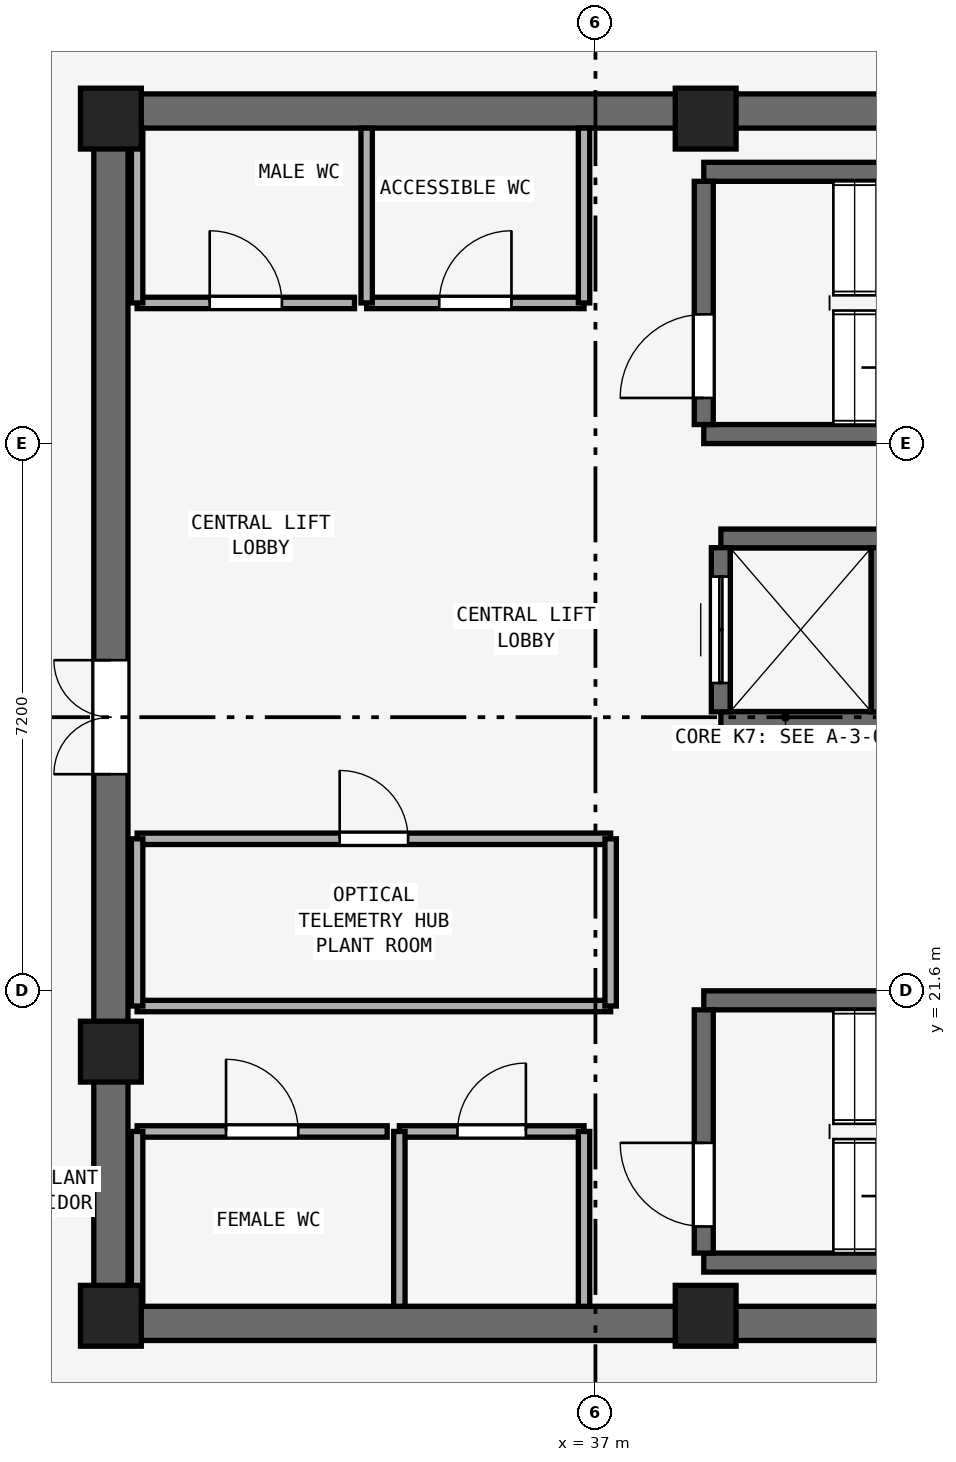
"""IFC4 building model, lengths in metres.
Left out: names, types, materials, properties, quantities, classifications, styles, units other than length and angle.
Written with IfcOpenShell. Run it as: python <this file> out.ifc"""

import sys

from ifc_helpers import new_model, si_unit, direction, frame, frame_2d, origin, origin_2d, place, context, subcontext, project, spatial, rectangle, extrude, element, fill, save


model = new_model("IFC4")
c1 = context("Model", 3, precision=1e-05, world=origin(), true_north=direction((0.0, 1.0)))
c2 = subcontext(c1, "Body", "Model", "MODEL_VIEW")
j1 = project(units=[si_unit("LENGTHUNIT", "METRE"), si_unit("PLANEANGLEUNIT", "RADIAN")], contexts=[c1])
p1 = place(None, origin())
s1 = spatial("IfcSite", under=j1, at=p1, CompositionType="ELEMENT")
p2 = place(p1, origin())
s2 = spatial("IfcBuilding", under=s1, at=p2, CompositionType="ELEMENT")
p3 = place(p2, frame((0.0, 0.0, 321.4)))
s3 = spatial("IfcBuildingStorey", under=s2, at=p3, CompositionType="ELEMENT", Elevation=321.4)
for number, where, z_axis, x_axis in (
    (1, (30.4, 17.225, 0.0), (0.0, 0.0, 1.0), (1.0, 0.0, 0.0)),
    (2, (30.4, 33.175, 0.0), (0.0, 0.0, 1.0), (1.0, 0.0, 0.0)),
):
    element("IfcWall", number, at=place(p3, frame(where, z_axis=z_axis, x_axis=x_axis)), inside=s3, PredefinedType="SHEAR", context=c2, shape_type="SweptSolid", body=[
        extrude(rectangle(XDim=18.2, YDim=0.45, at=frame_2d((9.1, 0.0))), origin(), (0.0, 0.0, 1.0), 3.72),
    ])
p4 = place(p3, frame((30.625, 17.45, 0.0), z_axis=(0.0, 0.0, 1.0), x_axis=(0.0, 1.0, 0.0)))
e3 = element("IfcWall", 3, at=p4, inside=s3, PredefinedType="SHEAR", context=c2, shape_type="SweptSolid", body=[
    extrude(rectangle(XDim=15.5, YDim=0.45, at=frame_2d((7.75, 0.0))), origin(), (0.0, 0.0, 1.0), 3.72),
])
p5 = place(p4, frame((7.0, 0.0, 0.0)))
e4 = element("IfcOpeningElement", 4, at=p5, cuts=e3, PredefinedType="OPENING", context=c2, shape_type="SweptSolid", body=[
    extrude(rectangle(XDim=1.5, YDim=2.15, at=frame_2d((0.75, 1.075))), frame((0.0, 0.235, 0.0), z_axis=(0.0, -1.0, 0.0), x_axis=(1.0, 0.0, 0.0)), (0.0, 0.0, 1.0), 0.47),
])
for number, where, z_axis, x_axis in (
    (5, (30.625, 17.325, 0.0), (0.0, 0.0, 1.0), (1.0, 0.0, 0.0)),
    (6, (38.45, 17.325, 0.0), (0.0, 0.0, 1.0), (1.0, 0.0, 0.0)),
    (7, (38.45, 33.075, 0.0), (0.0, 0.0, 1.0), (1.0, 0.0, 0.0)),
    (8, (30.625, 33.075, 0.0), (0.0, 0.0, 1.0), (1.0, 0.0, 0.0)),
    (9, (30.625, 20.8, 0.0), (0.0, 0.0, 1.0), (1.0, 0.0, 0.0)),
):
    element("IfcColumn", number, at=place(p3, frame(where, z_axis=z_axis, x_axis=x_axis)), inside=s3, PredefinedType="PILASTER", context=c2, shape_type="SweptSolid", body=[
        extrude(rectangle(XDim=0.8, YDim=0.8, at=origin_2d()), origin(), (0.0, 0.0, 1.0), 4.0),
    ])
for number, where, z_axis, x_axis in (
    (10, (38.425, 28.925, 0.0), (0.0, 0.0, 1.0), (1.0, 0.0, 0.0)),
    (11, (38.425, 32.375, 0.0), (0.0, 0.0, 1.0), (1.0, 0.0, 0.0)),
):
    element("IfcWall", number, at=place(p3, frame(where, z_axis=z_axis, x_axis=x_axis)), inside=s3, PredefinedType="SHEAR", context=c2, shape_type="SweptSolid", body=[
        extrude(rectangle(XDim=7.3, YDim=0.25, at=frame_2d((3.65, 0.0))), origin(), (0.0, 0.0, 1.0), 3.72),
    ])
p6 = place(p3, frame((38.425, 29.05, 0.0), z_axis=(0.0, 0.0, 1.0), x_axis=(0.0, 1.0, 0.0)))
e12 = element("IfcWall", 12, at=p6, inside=s3, PredefinedType="SHEAR", context=c2, shape_type="SweptSolid", body=[
    extrude(rectangle(XDim=3.2, YDim=0.25, at=frame_2d((1.6, 0.0))), origin(), (0.0, 0.0, 1.0), 3.72),
])
p7 = place(p6, frame((0.35, 0.0, 0.0)))
e13 = element("IfcOpeningElement", 13, at=p7, cuts=e12, PredefinedType="OPENING", context=c2, shape_type="SweptSolid", body=[
    extrude(rectangle(XDim=1.1, YDim=2.15, at=frame_2d((0.55, 1.075))), frame((0.0, 0.135, 0.0), z_axis=(0.0, -1.0, 0.0), x_axis=(1.0, 0.0, 0.0)), (0.0, 0.0, 1.0), 0.27),
])
for number, where, z_axis, x_axis in (
    (14, (38.425, 18.025, 0.0), (0.0, 0.0, 1.0), (1.0, 0.0, 0.0)),
    (15, (38.425, 21.475, 0.0), (0.0, 0.0, 1.0), (1.0, 0.0, 0.0)),
):
    element("IfcWall", number, at=place(p3, frame(where, z_axis=z_axis, x_axis=x_axis)), inside=s3, PredefinedType="SHEAR", context=c2, shape_type="SweptSolid", body=[
        extrude(rectangle(XDim=7.3, YDim=0.25, at=frame_2d((3.65, 0.0))), origin(), (0.0, 0.0, 1.0), 3.72),
    ])
p8 = place(p3, frame((38.425, 18.15, 0.0), z_axis=(0.0, 0.0, 1.0), x_axis=(0.0, 1.0, 0.0)))
e16 = element("IfcWall", 16, at=p8, inside=s3, PredefinedType="SHEAR", context=c2, shape_type="SweptSolid", body=[
    extrude(rectangle(XDim=3.2, YDim=0.25, at=frame_2d((1.6, 0.0))), origin(), (0.0, 0.0, 1.0), 3.72),
])
p9 = place(p8, frame((0.35, 0.0, 0.0)))
e17 = element("IfcOpeningElement", 17, at=p9, cuts=e16, PredefinedType="OPENING", context=c2, shape_type="SweptSolid", body=[
    extrude(rectangle(XDim=1.1, YDim=2.15, at=frame_2d((0.55, 1.075))), frame((0.0, 0.135, 0.0), z_axis=(0.0, -1.0, 0.0), x_axis=(1.0, 0.0, 0.0)), (0.0, 0.0, 1.0), 0.27),
])
for number, where, z_axis, x_axis in (
    (18, (38.65, 25.15, 0.0), (0.0, 0.0, 1.0), (1.0, 0.0, 0.0)),
    (19, (38.65, 27.55, 0.0), (0.0, 0.0, 1.0), (1.0, 0.0, 0.0)),
):
    element("IfcWall", number, at=place(p3, frame(where, z_axis=z_axis, x_axis=x_axis)), inside=s3, PredefinedType="SHEAR", context=c2, shape_type="SweptSolid", body=[
        extrude(rectangle(XDim=2.1, YDim=0.25, at=frame_2d((1.05, 0.0))), origin(), (0.0, 0.0, 1.0), 3.72),
    ])
p10 = place(p3, frame((38.65, 25.27, 0.0), z_axis=(0.0, 0.0, 1.0), x_axis=(0.0, 1.0, 0.0)))
e20 = element("IfcWall", 20, at=p10, inside=s3, PredefinedType="SHEAR", context=c2, shape_type="SweptSolid", body=[
    extrude(rectangle(XDim=2.16, YDim=0.25, at=frame_2d((1.08, 0.0))), origin(), (0.0, 0.0, 1.0), 3.72),
])
p11 = place(p10, frame((0.38, 0.0, 0.0)))
e21 = element("IfcOpeningElement", 21, at=p11, cuts=e20, PredefinedType="OPENING", context=c2, shape_type="SweptSolid", body=[
    extrude(rectangle(XDim=1.4, YDim=2.2, at=frame_2d((0.7, 1.1))), frame((0.0, 0.135, 0.0), z_axis=(0.0, -1.0, 0.0), x_axis=(1.0, 0.0, 0.0)), (0.0, 0.0, 1.0), 0.27),
])
p12 = place(p3, frame((40.75, 25.27, 0.0), z_axis=(0.0, 0.0, 1.0), x_axis=(0.0, 1.0, 0.0)))
e22 = element("IfcWall", 22, at=p12, inside=s3, PredefinedType="SHEAR", context=c2, shape_type="SweptSolid", body=[
    extrude(rectangle(XDim=2.16, YDim=0.25, at=frame_2d((1.08, 0.0))), origin(), (0.0, 0.0, 1.0), 3.72),
])
p13 = place(p3, frame((30.97, 30.65, 0.0), z_axis=(0.0, 0.0, 1.0), x_axis=(1.0, 0.0, 0.0)))
e23 = element("IfcWall", 23, at=p13, inside=s3, PredefinedType="PARTITIONING", context=c2, shape_type="SweptSolid", body=[
    extrude(rectangle(XDim=2.86, YDim=0.15, at=frame_2d((1.43, 0.0))), origin(), (0.0, 0.0, 1.0), 3.72),
])
p14 = place(p13, frame((0.955, 0.0, 0.0)))
e24 = element("IfcOpeningElement", 24, at=p14, cuts=e23, PredefinedType="OPENING", context=c2, shape_type="SweptSolid", body=[
    extrude(rectangle(XDim=0.95, YDim=2.1, at=frame_2d((0.475, 1.05))), frame((0.0, 0.085, 0.0), z_axis=(0.0, -1.0, 0.0), x_axis=(1.0, 0.0, 0.0)), (0.0, 0.0, 1.0), 0.17),
])
p15 = place(p3, frame((30.97, 30.65, 0.0), z_axis=(0.0, 0.0, 1.0), x_axis=(0.0, 1.0, 0.0)))
e25 = element("IfcWall", 25, at=p15, inside=s3, PredefinedType="PARTITIONING", context=c2, shape_type="SweptSolid", body=[
    extrude(rectangle(XDim=2.3, YDim=0.15, at=frame_2d((1.15, 0.0))), origin(), (0.0, 0.0, 1.0), 2.82),
])
p16 = place(p3, frame((33.99, 30.65, 0.0), z_axis=(0.0, 0.0, 1.0), x_axis=(1.0, 0.0, 0.0)))
e26 = element("IfcWall", 26, at=p16, inside=s3, PredefinedType="PARTITIONING", context=c2, shape_type="SweptSolid", body=[
    extrude(rectangle(XDim=2.86, YDim=0.15, at=frame_2d((1.43, 0.0))), origin(), (0.0, 0.0, 1.0), 3.72),
])
p17 = place(p16, frame((0.955, 0.0, 0.0)))
e27 = element("IfcOpeningElement", 27, at=p17, cuts=e26, PredefinedType="OPENING", context=c2, shape_type="SweptSolid", body=[
    extrude(rectangle(XDim=0.95, YDim=2.1, at=frame_2d((0.475, 1.05))), frame((0.0, 0.085, 0.0), z_axis=(0.0, -1.0, 0.0), x_axis=(1.0, 0.0, 0.0)), (0.0, 0.0, 1.0), 0.17),
])
for number, where, z_axis, x_axis in (
    (28, (33.99, 30.65, 0.0), (0.0, 0.0, 1.0), (0.0, 1.0, 0.0)),
    (29, (36.85, 30.65, 0.0), (0.0, 0.0, 1.0), (0.0, 1.0, 0.0)),
):
    element("IfcWall", number, at=place(p3, frame(where, z_axis=z_axis, x_axis=x_axis)), inside=s3, PredefinedType="PARTITIONING", context=c2, shape_type="SweptSolid", body=[
        extrude(rectangle(XDim=2.3, YDim=0.15, at=frame_2d((1.15, 0.0))), origin(), (0.0, 0.0, 1.0), 3.72),
    ])
p18 = place(p3, frame((30.97, 19.75, 0.0), z_axis=(0.0, 0.0, 1.0), x_axis=(1.0, 0.0, 0.0)))
e30 = element("IfcWall", 30, at=p18, inside=s3, PredefinedType="PARTITIONING", context=c2, shape_type="SweptSolid", body=[
    extrude(rectangle(XDim=3.29, YDim=0.15, at=frame_2d((1.645, 0.0))), origin(), (0.0, 0.0, 1.0), 3.72),
])
p19 = place(p18, frame((1.17, 0.0, 0.0)))
e31 = element("IfcOpeningElement", 31, at=p19, cuts=e30, PredefinedType="OPENING", context=c2, shape_type="SweptSolid", body=[
    extrude(rectangle(XDim=0.95, YDim=2.1, at=frame_2d((0.475, 1.05))), frame((0.0, 0.085, 0.0), z_axis=(0.0, -1.0, 0.0), x_axis=(1.0, 0.0, 0.0)), (0.0, 0.0, 1.0), 0.17),
])
p20 = place(p3, frame((30.97, 17.45, 0.0), z_axis=(0.0, 0.0, 1.0), x_axis=(0.0, 1.0, 0.0)))
e32 = element("IfcWall", 32, at=p20, inside=s3, PredefinedType="PARTITIONING", context=c2, shape_type="SweptSolid", body=[
    extrude(rectangle(XDim=2.3, YDim=0.15, at=frame_2d((1.15, 0.0))), origin(), (0.0, 0.0, 1.0), 2.82),
])
p21 = place(p3, frame((34.42, 19.75, 0.0), z_axis=(0.0, 0.0, 1.0), x_axis=(1.0, 0.0, 0.0)))
e33 = element("IfcWall", 33, at=p21, inside=s3, PredefinedType="PARTITIONING", context=c2, shape_type="SweptSolid", body=[
    extrude(rectangle(XDim=2.43, YDim=0.15, at=frame_2d((1.215, 0.0))), origin(), (0.0, 0.0, 1.0), 3.72),
])
p22 = place(p21, frame((0.765, 0.0, 0.0)))
e34 = element("IfcOpeningElement", 34, at=p22, cuts=e33, PredefinedType="OPENING", context=c2, shape_type="SweptSolid", body=[
    extrude(rectangle(XDim=0.9, YDim=2.1, at=frame_2d((0.45, 1.05))), frame((0.0, 0.085, 0.0), z_axis=(0.0, -1.0, 0.0), x_axis=(1.0, 0.0, 0.0)), (0.0, 0.0, 1.0), 0.17),
])
for number, where, z_axis, x_axis in (
    (35, (34.42, 17.45, 0.0), (0.0, 0.0, 1.0), (0.0, 1.0, 0.0)),
    (36, (36.85, 17.45, 0.0), (0.0, 0.0, 1.0), (0.0, 1.0, 0.0)),
):
    element("IfcWall", number, at=place(p3, frame(where, z_axis=z_axis, x_axis=x_axis)), inside=s3, PredefinedType="PARTITIONING", context=c2, shape_type="SweptSolid", body=[
        extrude(rectangle(XDim=2.3, YDim=0.15, at=frame_2d((1.15, 0.0))), origin(), (0.0, 0.0, 1.0), 3.72),
    ])
p23 = place(p3, frame((30.97, 21.4, 0.0), z_axis=(0.0, 0.0, 1.0), x_axis=(1.0, 0.0, 0.0)))
e37 = element("IfcWall", 37, at=p23, inside=s3, PredefinedType="PARTITIONING", context=c2, shape_type="SweptSolid", body=[
    extrude(rectangle(XDim=6.23, YDim=0.15, at=frame_2d((3.115, 0.0))), origin(), (0.0, 0.0, 1.0), 3.72),
])
p24 = place(p3, frame((30.97, 23.6, 0.0), z_axis=(0.0, 0.0, 1.0), x_axis=(1.0, 0.0, 0.0)))
e38 = element("IfcWall", 38, at=p24, inside=s3, PredefinedType="PARTITIONING", context=c2, shape_type="SweptSolid", body=[
    extrude(rectangle(XDim=6.23, YDim=0.15, at=frame_2d((3.115, 0.0))), origin(), (0.0, 0.0, 1.0), 3.72),
])
p25 = place(p24, frame((2.665, 0.0, 0.0)))
e39 = element("IfcOpeningElement", 39, at=p25, cuts=e38, PredefinedType="OPENING", context=c2, shape_type="SweptSolid", body=[
    extrude(rectangle(XDim=0.9, YDim=2.1, at=frame_2d((0.45, 1.05))), frame((0.0, 0.085, 0.0), z_axis=(0.0, -1.0, 0.0), x_axis=(1.0, 0.0, 0.0)), (0.0, 0.0, 1.0), 0.17),
])
p26 = place(p3, frame((30.97, 21.4, 0.0), z_axis=(0.0, 0.0, 1.0), x_axis=(0.0, 1.0, 0.0)))
e40 = element("IfcWall", 40, at=p26, inside=s3, PredefinedType="PARTITIONING", context=c2, shape_type="SweptSolid", body=[
    extrude(rectangle(XDim=2.2, YDim=0.15, at=frame_2d((1.1, 0.0))), origin(), (0.0, 0.0, 1.0), 2.82),
])
p27 = place(p3, frame((37.2, 21.4, 0.0), z_axis=(0.0, 0.0, 1.0), x_axis=(0.0, 1.0, 0.0)))
e41 = element("IfcWall", 41, at=p27, inside=s3, PredefinedType="PARTITIONING", context=c2, shape_type="SweptSolid", body=[
    extrude(rectangle(XDim=2.2, YDim=0.15, at=frame_2d((1.1, 0.0))), origin(), (0.0, 0.0, 1.0), 3.72),
])
p28 = place(p3, frame((31.856, 40.999, 0.0), z_axis=(0.0, 0.0, 1.0), x_axis=(-0.756468872678, -0.654029697085, 0.0)))
e42 = element("IfcWall", 42, at=p28, inside=s3, PredefinedType="STANDARD", context=c2, shape_type="SweptSolid", body=[
    extrude(rectangle(XDim=11.18, YDim=0.28, at=frame_2d((5.59, 0.0))), origin(), (0.0, 0.0, 1.0), 3.72),
])
p29 = place(p28, frame((1.397, 0.0, 0.9)))
e43 = element("IfcOpeningElement", 43, at=p29, cuts=e42, PredefinedType="OPENING", context=c2, shape_type="SweptSolid", body=[
    extrude(rectangle(XDim=1.6, YDim=1.45, at=frame_2d((0.8, 0.725))), frame((0.0, 0.15, 0.0), z_axis=(0.0, -1.0, 0.0), x_axis=(1.0, 0.0, 0.0)), (0.0, 0.0, 1.0), 0.3),
])
p30 = place(p28, frame((4.79, 0.0, 0.9)))
e44 = element("IfcOpeningElement", 44, at=p30, cuts=e42, PredefinedType="OPENING", context=c2, shape_type="SweptSolid", body=[
    extrude(rectangle(XDim=1.6, YDim=1.45, at=frame_2d((0.8, 0.725))), frame((0.0, 0.15, 0.0), z_axis=(0.0, -1.0, 0.0), x_axis=(1.0, 0.0, 0.0)), (0.0, 0.0, 1.0), 0.3),
])
p31 = place(p7, origin())
e45 = element("IfcDoor", 45, at=p31, inside=s3, OperationType="SINGLE_SWING_LEFT", PredefinedType="DOOR", context=c2, shape_type="SweptSolid", body=[
    extrude(rectangle(XDim=1.1, YDim=2.15, at=frame_2d((0.55, 1.075))), frame((0.0, 0.025, 0.0), z_axis=(0.0, -1.0, 0.0), x_axis=(1.0, 0.0, 0.0)), (0.0, 0.0, 1.0), 0.05),
])
fill(e13, e45)
p32 = place(p9, origin())
e46 = element("IfcDoor", 46, at=p32, inside=s3, OperationType="SINGLE_SWING_RIGHT", PredefinedType="DOOR", context=c2, shape_type="SweptSolid", body=[
    extrude(rectangle(XDim=1.1, YDim=2.15, at=frame_2d((0.55, 1.075))), frame((0.0, 0.025, 0.0), z_axis=(0.0, -1.0, 0.0), x_axis=(1.0, 0.0, 0.0)), (0.0, 0.0, 1.0), 0.05),
])
fill(e17, e46)
p33 = place(p11, origin())
e47 = element("IfcDoor", 47, at=p33, inside=s3, OperationType="DOUBLE_DOOR_SLIDING", PredefinedType="DOOR", context=c2, shape_type="SweptSolid", body=[
    extrude(rectangle(XDim=1.4, YDim=2.2, at=frame_2d((0.7, 1.1))), frame((0.0, 0.025, 0.0), z_axis=(0.0, -1.0, 0.0), x_axis=(1.0, 0.0, 0.0)), (0.0, 0.0, 1.0), 0.05),
])
fill(e21, e47)
p34 = place(p5, origin())
e48 = element("IfcDoor", 48, at=p34, inside=s3, OperationType="DOUBLE_DOOR_SINGLE_SWING", PredefinedType="DOOR", context=c2, shape_type="SweptSolid", body=[
    extrude(rectangle(XDim=1.5, YDim=2.15, at=frame_2d((0.75, 1.075))), frame((0.0, 0.025, 0.0), z_axis=(0.0, -1.0, 0.0), x_axis=(1.0, 0.0, 0.0)), (0.0, 0.0, 1.0), 0.05),
])
fill(e4, e48)
p35 = place(p14, origin())
e49 = element("IfcDoor", 49, at=p35, inside=s3, OperationType="SINGLE_SWING_LEFT", PredefinedType="DOOR", context=c2, shape_type="SweptSolid", body=[
    extrude(rectangle(XDim=0.95, YDim=2.1, at=frame_2d((0.475, 1.05))), frame((0.0, 0.025, 0.0), z_axis=(0.0, -1.0, 0.0), x_axis=(1.0, 0.0, 0.0)), (0.0, 0.0, 1.0), 0.05),
])
fill(e24, e49)
p36 = place(p17, origin())
e50 = element("IfcDoor", 50, at=p36, inside=s3, OperationType="SINGLE_SWING_RIGHT", PredefinedType="DOOR", context=c2, shape_type="SweptSolid", body=[
    extrude(rectangle(XDim=0.95, YDim=2.1, at=frame_2d((0.475, 1.05))), frame((0.0, 0.025, 0.0), z_axis=(0.0, -1.0, 0.0), x_axis=(1.0, 0.0, 0.0)), (0.0, 0.0, 1.0), 0.05),
])
fill(e27, e50)
p37 = place(p19, origin())
e51 = element("IfcDoor", 51, at=p37, inside=s3, OperationType="SINGLE_SWING_LEFT", PredefinedType="DOOR", context=c2, shape_type="SweptSolid", body=[
    extrude(rectangle(XDim=0.95, YDim=2.1, at=frame_2d((0.475, 1.05))), frame((0.0, 0.025, 0.0), z_axis=(0.0, -1.0, 0.0), x_axis=(1.0, 0.0, 0.0)), (0.0, 0.0, 1.0), 0.05),
])
fill(e31, e51)
p38 = place(p22, origin())
e52 = element("IfcDoor", 52, at=p38, inside=s3, OperationType="SINGLE_SWING_RIGHT", PredefinedType="DOOR", context=c2, shape_type="SweptSolid", body=[
    extrude(rectangle(XDim=0.9, YDim=2.1, at=frame_2d((0.45, 1.05))), frame((0.0, 0.025, 0.0), z_axis=(0.0, -1.0, 0.0), x_axis=(1.0, 0.0, 0.0)), (0.0, 0.0, 1.0), 0.05),
])
fill(e34, e52)
p39 = place(p25, origin())
e53 = element("IfcDoor", 53, at=p39, inside=s3, OperationType="SINGLE_SWING_LEFT", PredefinedType="DOOR", context=c2, shape_type="SweptSolid", body=[
    extrude(rectangle(XDim=0.9, YDim=2.1, at=frame_2d((0.45, 1.05))), frame((0.0, 0.025, 0.0), z_axis=(0.0, -1.0, 0.0), x_axis=(1.0, 0.0, 0.0)), (0.0, 0.0, 1.0), 0.05),
])
fill(e39, e53)
save(model, sys.argv[1])
